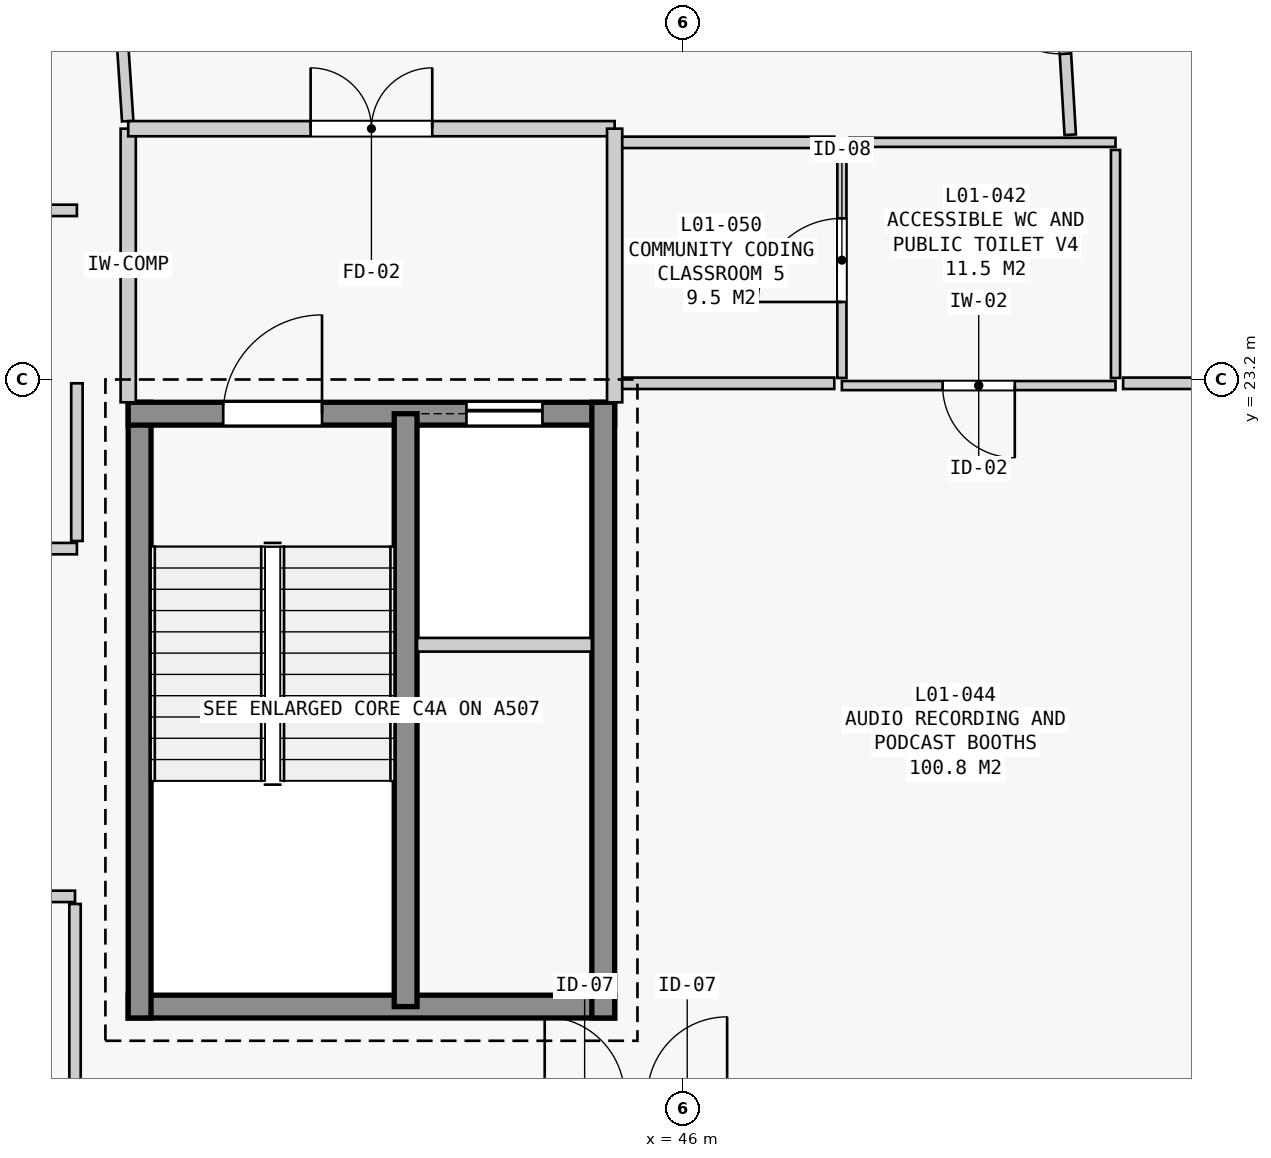
"""IFC4 building model, lengths in metres.
Left out: names, types, materials, properties, quantities, classifications, styles, units other than length and angle.
Written with IfcOpenShell. Run it as: python <this file> out.ifc"""

import sys

from ifc_helpers import new_model, si_unit, direction, frame, frame_2d, origin, place, context, subcontext, project, spatial, rectangle, extrude, element, fill, save


model = new_model("IFC4")
c1 = context("Model", 3, precision=1e-05, world=origin(), true_north=direction((0.0, 1.0)))
c2 = subcontext(c1, "Body", "Model", "MODEL_VIEW")
j1 = project(units=[si_unit("LENGTHUNIT", "METRE"), si_unit("PLANEANGLEUNIT", "RADIAN")], contexts=[c1])
p1 = place(None, origin())
s1 = spatial("IfcSite", under=j1, at=p1, CompositionType="ELEMENT")
p2 = place(p1, origin())
s2 = spatial("IfcBuilding", under=s1, at=p2, CompositionType="ELEMENT")
p3 = place(p2, frame((0.0, 0.0, 5.4)))
s3 = spatial("IfcBuildingStorey", under=s2, at=p3, CompositionType="ELEMENT", Elevation=5.4)
p4 = place(p3, frame((45.1, 14.95, 0.0), z_axis=(0.0, 0.0, 1.0), x_axis=(-1.0, 0.0, 0.0)))
e1 = element("IfcWall", 1, at=p4, inside=s3, PredefinedType="SHEAR", context=c2, shape_type="SweptSolid", body=[
    extrude(rectangle(XDim=6.4, YDim=0.3, at=frame_2d((3.2, 0.0))), origin(), (0.0, 0.0, 1.0), 3.94),
])
p5 = place(p3, frame((38.85, 14.8, 0.0), z_axis=(0.0, 0.0, 1.0), x_axis=(0.0, 1.0, 0.0)))
e2 = element("IfcWall", 2, at=p5, inside=s3, PredefinedType="SHEAR", context=c2, shape_type="SweptSolid", body=[
    extrude(rectangle(XDim=8.1, YDim=0.3, at=frame_2d((4.05, 0.0))), origin(), (0.0, 0.0, 1.0), 3.94),
])
p6 = place(p3, frame((38.7, 22.75, 0.0), z_axis=(0.0, 0.0, 1.0), x_axis=(1.0, 0.0, 0.0)))
e3 = element("IfcWall", 3, at=p6, inside=s3, PredefinedType="SHEAR", context=c2, shape_type="SweptSolid", body=[
    extrude(rectangle(XDim=6.4, YDim=0.3, at=frame_2d((3.2, 0.0))), origin(), (0.0, 0.0, 1.0), 3.94),
])
p7 = place(p6, frame((1.25, 0.0, 0.0)))
e4 = element("IfcOpeningElement", 4, at=p7, cuts=e3, PredefinedType="OPENING", context=c2, shape_type="SweptSolid", body=[
    extrude(rectangle(XDim=1.3, YDim=2.2, at=frame_2d((0.65, 1.1))), frame((0.0, 0.16, 0.0), z_axis=(0.0, -1.0, 0.0), x_axis=(1.0, 0.0, 0.0)), (0.0, 0.0, 1.0), 0.32),
])
p8 = place(p6, frame((4.45, 0.0, 0.0)))
e5 = element("IfcOpeningElement", 5, at=p8, cuts=e3, PredefinedType="OPENING", context=c2, shape_type="SweptSolid", body=[
    extrude(rectangle(XDim=1.0, YDim=2.15, at=frame_2d((0.5, 1.075))), frame((0.0, 0.16, 0.0), z_axis=(0.0, -1.0, 0.0), x_axis=(1.0, 0.0, 0.0)), (0.0, 0.0, 1.0), 0.32),
])
p9 = place(p3, frame((44.95, 22.9, 0.0), z_axis=(0.0, 0.0, 1.0), x_axis=(0.0, -1.0, 0.0)))
e6 = element("IfcWall", 6, at=p9, inside=s3, PredefinedType="SHEAR", context=c2, shape_type="SweptSolid", body=[
    extrude(rectangle(XDim=8.1, YDim=0.3, at=frame_2d((4.05, 0.0))), origin(), (0.0, 0.0, 1.0), 3.94),
])
p10 = place(p3, frame((42.35, 14.95, 0.0), z_axis=(0.0, 0.0, 1.0), x_axis=(0.0, 1.0, 0.0)))
e7 = element("IfcWall", 7, at=p10, inside=s3, PredefinedType="SHEAR", context=c2, shape_type="SweptSolid", body=[
    extrude(rectangle(XDim=7.8, YDim=0.3, at=frame_2d((3.9, 0.0))), origin(), (0.0, 0.0, 1.0), 3.94),
])
p11 = place(p3, frame((42.5, 19.71, 0.0), z_axis=(0.0, 0.0, 1.0), x_axis=(1.0, 0.0, 0.0)))
e8 = element("IfcWall", 8, at=p11, inside=s3, PredefinedType="PARTITIONING", context=c2, shape_type="SweptSolid", body=[
    extrude(rectangle(XDim=2.3, YDim=0.18, at=frame_2d((1.15, 0.0))), origin(), (0.0, 0.0, 1.0), 3.94),
])
p12 = place(p3, frame((38.7, 22.9, 0.0), z_axis=(0.0, 0.0, 1.0), x_axis=(0.0, 1.0, 0.0)))
e9 = element("IfcWall", 9, at=p12, inside=s3, PredefinedType="STANDARD", context=c2, shape_type="SweptSolid", body=[
    extrude(rectangle(XDim=3.6, YDim=0.2, at=frame_2d((1.8, 0.0))), origin(), (0.0, 0.0, 1.0), 3.12),
])
p13 = place(p3, frame((38.7, 26.5, 0.0), z_axis=(0.0, 0.0, 1.0), x_axis=(1.0, 0.0, 0.0)))
e10 = element("IfcWall", 10, at=p13, inside=s3, PredefinedType="STANDARD", context=c2, shape_type="SweptSolid", body=[
    extrude(rectangle(XDim=6.4, YDim=0.2, at=frame_2d((3.2, 0.0))), origin(), (0.0, 0.0, 1.0), 3.42),
])
p14 = place(p13, frame((2.4, 0.0, 0.0)))
e11 = element("IfcOpeningElement", 11, at=p14, cuts=e10, PredefinedType="OPENING", context=c2, shape_type="SweptSolid", body=[
    extrude(rectangle(XDim=1.6, YDim=2.2, at=frame_2d((0.8, 1.1))), frame((0.0, 0.11, 0.0), z_axis=(0.0, -1.0, 0.0), x_axis=(1.0, 0.0, 0.0)), (0.0, 0.0, 1.0), 0.22),
])
p15 = place(p3, frame((45.1, 26.5, 0.0), z_axis=(0.0, 0.0, 1.0), x_axis=(0.0, -1.0, 0.0)))
e12 = element("IfcWall", 12, at=p15, inside=s3, PredefinedType="STANDARD", context=c2, shape_type="SweptSolid", body=[
    extrude(rectangle(XDim=3.6, YDim=0.2, at=frame_2d((1.8, 0.0))), origin(), (0.0, 0.0, 1.0), 3.12),
])
p16 = place(p3, frame((51.69, 23.12, 0.0), z_axis=(0.0, 0.0, 1.0), x_axis=(-1.0, 0.0, 0.0)))
e13 = element("IfcWall", 13, at=p16, inside=s3, PredefinedType="PARTITIONING", context=c2, shape_type="SweptSolid", body=[
    extrude(rectangle(XDim=3.6, YDim=0.12, at=frame_2d((1.8, 0.0))), origin(), (0.0, 0.0, 1.0), 3.12),
])
p17 = place(p16, frame((1.325, 0.0, 0.0)))
e14 = element("IfcOpeningElement", 14, at=p17, cuts=e13, PredefinedType="OPENING", context=c2, shape_type="SweptSolid", body=[
    extrude(rectangle(XDim=0.95, YDim=2.15, at=frame_2d((0.475, 1.075))), frame((0.0, 0.07, 0.0), z_axis=(0.0, -1.0, 0.0), x_axis=(1.0, 0.0, 0.0)), (0.0, 0.0, 1.0), 0.14),
])
p18 = place(p3, frame((48.09, 23.22, 0.0), z_axis=(0.0, 0.0, 1.0), x_axis=(0.0, 1.0, 0.0)))
e15 = element("IfcWall", 15, at=p18, inside=s3, PredefinedType="PARTITIONING", context=c2, shape_type="SweptSolid", body=[
    extrude(rectangle(XDim=3.1, YDim=0.12, at=frame_2d((1.55, 0.0))), origin(), (0.0, 0.0, 1.0), 3.12),
])
p19 = place(p18, frame((1.0, 0.0, 0.0)))
e16 = element("IfcOpeningElement", 16, at=p19, cuts=e15, PredefinedType="OPENING", context=c2, shape_type="SweptSolid", body=[
    extrude(rectangle(XDim=1.1, YDim=2.2, at=frame_2d((0.55, 1.1))), frame((0.0, 0.07, 0.0), z_axis=(0.0, -1.0, 0.0), x_axis=(1.0, 0.0, 0.0)), (0.0, 0.0, 1.0), 0.14),
])
p20 = place(p3, frame((48.19, 26.32, 0.0), z_axis=(0.0, 0.0, 1.0), x_axis=(1.0, 0.0, 0.0)))
e17 = element("IfcWall", 17, at=p20, inside=s3, PredefinedType="PARTITIONING", context=c2, shape_type="SweptSolid", body=[
    extrude(rectangle(XDim=3.5, YDim=0.12, at=frame_2d((1.75, 0.0))), origin(), (0.0, 0.0, 1.0), 3.94),
])
p21 = place(p3, frame((51.69, 26.22, 0.0), z_axis=(0.0, 0.0, 1.0), x_axis=(0.0, -1.0, 0.0)))
e18 = element("IfcWall", 18, at=p21, inside=s3, PredefinedType="PARTITIONING", context=c2, shape_type="SweptSolid", body=[
    extrude(rectangle(XDim=3.0, YDim=0.12, at=frame_2d((1.5, 0.0))), origin(), (0.0, 0.0, 1.0), 3.12),
])
p22 = place(p3, frame((38.0, 16.4, 0.0), z_axis=(0.0, 0.0, 1.0), x_axis=(-1.0, 0.0, 0.0)))
e19 = element("IfcWall", 19, at=p22, inside=s3, PredefinedType="PARTITIONING", context=c2, shape_type="SweptSolid", body=[
    extrude(rectangle(XDim=1.82, YDim=0.15, at=frame_2d((0.91, 0.0))), origin(), (0.0, 0.0, 1.0), 3.94),
])
p23 = place(p3, frame((36.28, 20.975, 0.0), z_axis=(0.0, 0.0, 1.0), x_axis=(1.0, 0.0, 0.0)))
e20 = element("IfcWall", 20, at=p23, inside=s3, PredefinedType="PARTITIONING", context=c2, shape_type="SweptSolid", body=[
    extrude(rectangle(XDim=1.745, YDim=0.15, at=frame_2d((0.873, 0.0))), origin(), (0.0, 0.0, 1.0), 3.94),
])
p24 = place(p3, frame((38.025, 21.075, 0.0), z_axis=(0.0, 0.0, 1.0), x_axis=(0.0, 1.0, 0.0)))
e21 = element("IfcWall", 21, at=p24, inside=s3, PredefinedType="PARTITIONING", context=c2, shape_type="SweptSolid", body=[
    extrude(rectangle(XDim=2.075, YDim=0.15, at=frame_2d((1.038, 0.0))), origin(), (0.0, 0.0, 1.0), 3.12),
])
p25 = place(p3, frame((38.0, 13.865, 0.0), z_axis=(0.0, 0.0, 1.0), x_axis=(0.0, 1.0, 0.0)))
e22 = element("IfcWall", 22, at=p25, inside=s3, PredefinedType="PARTITIONING", context=c2, shape_type="SweptSolid", body=[
    extrude(rectangle(XDim=2.435, YDim=0.15, at=frame_2d((1.218, 0.0))), origin(), (0.0, 0.0, 1.0), 3.22),
])
p26 = place(p3, frame((51.094, 26.42, 0.0), z_axis=(0.0, 0.0, 1.0), x_axis=(-0.059009535749, 0.998257419051, 0.0)))
e23 = element("IfcWall", 23, at=p26, inside=s3, PredefinedType="PARTITIONING", context=c2, shape_type="SweptSolid", body=[
    extrude(rectangle(XDim=3.186, YDim=0.15, at=frame_2d((1.593, 0.0))), origin(), (0.0, 0.0, 1.0), 3.94),
])
p27 = place(p26, frame((1.068, 0.0, 0.0)))
e24 = element("IfcOpeningElement", 24, at=p27, cuts=e23, PredefinedType="OPENING", context=c2, shape_type="SweptSolid", body=[
    extrude(rectangle(XDim=1.05, YDim=2.2, at=frame_2d((0.525, 1.1))), frame((0.0, 0.085, 0.0), z_axis=(0.0, -1.0, 0.0), x_axis=(1.0, 0.0, 0.0)), (0.0, 0.0, 1.0), 0.17),
])
p28 = place(p3, frame((53.92, 23.15, 0.0), z_axis=(0.0, 0.0, 1.0), x_axis=(-1.0, 0.0, 0.0)))
e25 = element("IfcWall", 25, at=p28, inside=s3, PredefinedType="PARTITIONING", context=c2, shape_type="SweptSolid", body=[
    extrude(rectangle(XDim=2.13, YDim=0.15, at=frame_2d((1.065, 0.0))), origin(), (0.0, 0.0, 1.0), 3.12),
])
p29 = place(p3, frame((38.025, 25.425, 0.0), z_axis=(0.0, 0.0, 1.0), x_axis=(-1.0, 0.0, 0.0)))
e26 = element("IfcWall", 26, at=p29, inside=s3, PredefinedType="PARTITIONING", context=c2, shape_type="SweptSolid", body=[
    extrude(rectangle(XDim=1.845, YDim=0.15, at=frame_2d((0.922, 0.0))), origin(), (0.0, 0.0, 1.0), 3.94),
])
p30 = place(p3, frame((38.507, 29.4, 0.0), z_axis=(0.0, 0.0, 1.0), x_axis=(0.066547879088, -0.997783232866, 0.0)))
e27 = element("IfcWall", 27, at=p30, inside=s3, PredefinedType="PARTITIONING", context=c2, shape_type="SweptSolid", body=[
    extrude(rectangle(XDim=2.806, YDim=0.15, at=frame_2d((1.403, 0.0))), origin(), (0.0, 0.0, 1.0), 3.94),
])
p31 = place(p3, frame((45.2, 26.32, 0.0), z_axis=(0.0, 0.0, 1.0), x_axis=(1.0, 0.0, 0.0)))
e28 = element("IfcWall", 28, at=p31, inside=s3, PredefinedType="PARTITIONING", context=c2, shape_type="SweptSolid", body=[
    extrude(rectangle(XDim=2.79, YDim=0.15, at=frame_2d((1.395, 0.0))), origin(), (0.0, 0.0, 1.0), 3.94),
])
p32 = place(p3, frame((47.99, 23.15, 0.0), z_axis=(0.0, 0.0, 1.0), x_axis=(-1.0, 0.0, 0.0)))
e29 = element("IfcWall", 29, at=p32, inside=s3, PredefinedType="PARTITIONING", context=c2, shape_type="SweptSolid", body=[
    extrude(rectangle(XDim=2.79, YDim=0.15, at=frame_2d((1.395, 0.0))), origin(), (0.0, 0.0, 1.0), 3.12),
])
p33 = place(p7, origin())
e30 = element("IfcDoor", 30, at=p33, inside=s3, OperationType="SINGLE_SWING_RIGHT", PredefinedType="DOOR", context=c2, shape_type="SweptSolid", body=[
    extrude(rectangle(XDim=1.3, YDim=2.2, at=frame_2d((0.65, 1.1))), frame((0.0, 0.025, 0.0), z_axis=(0.0, -1.0, 0.0), x_axis=(1.0, 0.0, 0.0)), (0.0, 0.0, 1.0), 0.05),
])
fill(e4, e30)
p34 = place(p8, origin())
e31 = element("IfcDoor", 31, at=p34, inside=s3, OperationType="SLIDING_TO_LEFT", PredefinedType="DOOR", context=c2, shape_type="SweptSolid", body=[
    extrude(rectangle(XDim=1.0, YDim=2.15, at=frame_2d((0.5, 1.075))), frame((0.0, 0.025, 0.0), z_axis=(0.0, -1.0, 0.0), x_axis=(1.0, 0.0, 0.0)), (0.0, 0.0, 1.0), 0.05),
])
fill(e5, e31)
p35 = place(p14, origin())
e32 = element("IfcDoor", 32, at=p35, inside=s3, OperationType="DOUBLE_DOOR_SINGLE_SWING", PredefinedType="DOOR", context=c2, shape_type="SweptSolid", body=[
    extrude(rectangle(XDim=1.6, YDim=2.2, at=frame_2d((0.8, 1.1))), frame((0.0, 0.025, 0.0), z_axis=(0.0, -1.0, 0.0), x_axis=(1.0, 0.0, 0.0)), (0.0, 0.0, 1.0), 0.05),
])
fill(e11, e32)
p36 = place(p17, origin())
e33 = element("IfcDoor", 33, at=p36, inside=s3, OperationType="SINGLE_SWING_LEFT", PredefinedType="DOOR", context=c2, shape_type="SweptSolid", body=[
    extrude(rectangle(XDim=0.95, YDim=2.15, at=frame_2d((0.475, 1.075))), frame((0.0, 0.025, 0.0), z_axis=(0.0, -1.0, 0.0), x_axis=(1.0, 0.0, 0.0)), (0.0, 0.0, 1.0), 0.05),
])
fill(e14, e33)
p37 = place(p27, origin())
e34 = element("IfcDoor", 34, at=p37, inside=s3, OperationType="SINGLE_SWING_RIGHT", PredefinedType="DOOR", context=c2, shape_type="SweptSolid", body=[
    extrude(rectangle(XDim=1.05, YDim=2.2, at=frame_2d((0.525, 1.1))), frame((0.0, 0.025, 0.0), z_axis=(0.0, -1.0, 0.0), x_axis=(1.0, 0.0, 0.0)), (0.0, 0.0, 1.0), 0.05),
])
fill(e24, e34)
p38 = place(p19, origin())
e35 = element("IfcDoor", 35, at=p38, inside=s3, OperationType="SINGLE_SWING_LEFT", PredefinedType="DOOR", context=c2, shape_type="SweptSolid", body=[
    extrude(rectangle(XDim=1.1, YDim=2.2, at=frame_2d((0.55, 1.1))), frame((0.0, 0.025, 0.0), z_axis=(0.0, -1.0, 0.0), x_axis=(1.0, 0.0, 0.0)), (0.0, 0.0, 1.0), 0.05),
])
fill(e16, e35)
save(model, sys.argv[1])
